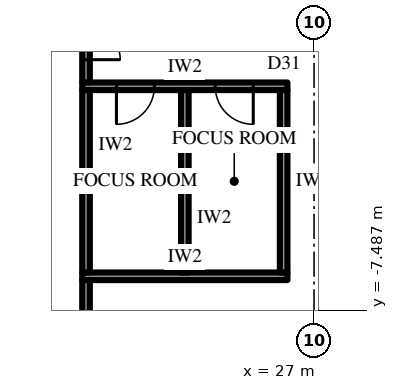
"""IFC4 building model, lengths in metres.
Left out: names, types, materials, properties, quantities, classifications, styles, units other than length and angle.
Written with IfcOpenShell. Run it as: python <this file> out.ifc"""

import sys

from ifc_helpers import new_model, si_unit, direction, frame, frame_2d, origin, place, context, subcontext, project, spatial, rectangle, extrude, element, fill, save


model = new_model("IFC4")
c1 = context("Model", 3, precision=1e-05, world=origin(), true_north=direction((0.0, 1.0)))
c2 = subcontext(c1, "Body", "Model", "MODEL_VIEW")
j1 = project(units=[si_unit("LENGTHUNIT", "METRE"), si_unit("PLANEANGLEUNIT", "RADIAN")], contexts=[c1])
p1 = place(None, origin())
s1 = spatial("IfcSite", under=j1, at=p1, CompositionType="ELEMENT")
p2 = place(p1, origin())
s2 = spatial("IfcBuilding", under=s1, at=p2, CompositionType="ELEMENT")
p3 = place(p2, frame((0.0, 0.0, 44.5)))
s3 = spatial("IfcBuildingStorey", under=s2, at=p3, CompositionType="ELEMENT", Elevation=44.5)
p4 = place(p3, frame((21.232, -30.925, 0.0), z_axis=(0.0, 0.0, 1.0), x_axis=(0.499999163675, 0.866025886636, 0.0)))
e1 = element("IfcWall", 1, at=p4, inside=s3, PredefinedType="SOLIDWALL", context=c2, shape_type="SweptSolid", body=[
    extrude(rectangle(XDim=32.332, YDim=0.3, at=frame_2d((16.166, 0.0))), origin(), (0.0, 0.0, 1.0), 2.7),
])
p5 = place(p4, frame((1.319, 0.0, 0.6)))
e2 = element("IfcOpeningElement", 2, at=p5, cuts=e1, PredefinedType="OPENING", context=c2, shape_type="SweptSolid", body=[
    extrude(rectangle(XDim=2.75, YDim=1.85, at=frame_2d((1.375, 0.925))), frame((0.0, 0.16, 0.0), z_axis=(0.0, -1.0, 0.0), x_axis=(1.0, 0.0, 0.0)), (0.0, 0.0, 1.0), 0.32),
])
p6 = place(p4, frame((6.708, 0.0, 0.6)))
e3 = element("IfcOpeningElement", 3, at=p6, cuts=e1, PredefinedType="OPENING", context=c2, shape_type="SweptSolid", body=[
    extrude(rectangle(XDim=2.75, YDim=1.85, at=frame_2d((1.375, 0.925))), frame((0.0, 0.16, 0.0), z_axis=(0.0, -1.0, 0.0), x_axis=(1.0, 0.0, 0.0)), (0.0, 0.0, 1.0), 0.32),
])
p7 = place(p4, frame((12.872, 0.0, 0.0)))
e4 = element("IfcOpeningElement", 4, at=p7, cuts=e1, PredefinedType="OPENING", context=c2, shape_type="SweptSolid", body=[
    extrude(rectangle(XDim=1.2, YDim=2.4, at=frame_2d((0.6, 1.2))), frame((0.0, 0.16, 0.0), z_axis=(0.0, -1.0, 0.0), x_axis=(1.0, 0.0, 0.0)), (0.0, 0.0, 1.0), 0.32),
])
p8 = place(p4, frame((17.485, 0.0, 0.6)))
e5 = element("IfcOpeningElement", 5, at=p8, cuts=e1, PredefinedType="OPENING", context=c2, shape_type="SweptSolid", body=[
    extrude(rectangle(XDim=2.75, YDim=1.85, at=frame_2d((1.375, 0.925))), frame((0.0, 0.16, 0.0), z_axis=(0.0, -1.0, 0.0), x_axis=(1.0, 0.0, 0.0)), (0.0, 0.0, 1.0), 0.32),
])
p9 = place(p4, frame((22.874, 0.0, 0.6)))
e6 = element("IfcOpeningElement", 6, at=p9, cuts=e1, PredefinedType="OPENING", context=c2, shape_type="SweptSolid", body=[
    extrude(rectangle(XDim=2.75, YDim=1.85, at=frame_2d((1.375, 0.925))), frame((0.0, 0.16, 0.0), z_axis=(0.0, -1.0, 0.0), x_axis=(1.0, 0.0, 0.0)), (0.0, 0.0, 1.0), 0.32),
])
p10 = place(p4, frame((28.262, 0.0, 0.6)))
e7 = element("IfcOpeningElement", 7, at=p10, cuts=e1, PredefinedType="OPENING", context=c2, shape_type="SweptSolid", body=[
    extrude(rectangle(XDim=2.75, YDim=1.85, at=frame_2d((1.375, 0.925))), frame((0.0, 0.16, 0.0), z_axis=(0.0, -1.0, 0.0), x_axis=(1.0, 0.0, 0.0)), (0.0, 0.0, 1.0), 0.32),
])
p11 = place(p3, frame((20.9, -1.6, 0.0), z_axis=(0.0, 0.0, 1.0), x_axis=(1.0, 0.0, 0.0)))
e8 = element("IfcWall", 8, at=p11, inside=s3, PredefinedType="PARTITIONING", context=c2, shape_type="SweptSolid", body=[
    extrude(rectangle(XDim=5.4, YDim=0.2, at=frame_2d((2.7, 0.0))), origin(), (0.0, 0.0, 1.0), 4.0),
])
p12 = place(p11, frame((0.9, 0.0, 0.0)))
e9 = element("IfcOpeningElement", 9, at=p12, cuts=e8, PredefinedType="OPENING", context=c2, shape_type="SweptSolid", body=[
    extrude(rectangle(XDim=1.0, YDim=2.2, at=frame_2d((0.5, 1.1))), frame((0.0, 0.11, 0.0), z_axis=(0.0, -1.0, 0.0), x_axis=(1.0, 0.0, 0.0)), (0.0, 0.0, 1.0), 0.22),
])
p13 = place(p11, frame((3.5, 0.0, 0.0)))
e10 = element("IfcOpeningElement", 10, at=p13, cuts=e8, PredefinedType="OPENING", context=c2, shape_type="SweptSolid", body=[
    extrude(rectangle(XDim=1.0, YDim=2.2, at=frame_2d((0.5, 1.1))), frame((0.0, 0.11, 0.0), z_axis=(0.0, -1.0, 0.0), x_axis=(1.0, 0.0, 0.0)), (0.0, 0.0, 1.0), 0.22),
])
p14 = place(p3, frame((20.9, -6.6, 0.0), z_axis=(0.0, 0.0, 1.0), x_axis=(1.0, 0.0, 0.0)))
e11 = element("IfcWall", 11, at=p14, inside=s3, PredefinedType="PARTITIONING", context=c2, shape_type="SweptSolid", body=[
    extrude(rectangle(XDim=5.4, YDim=0.2, at=frame_2d((2.7, 0.0))), origin(), (0.0, 0.0, 1.0), 4.0),
])
for number, where, z_axis, x_axis in (
    (12, (21.0, -1.7, 0.0), (0.0, 0.0, 1.0), (0.0, -1.0, 0.0)),
    (13, (23.6, -1.7, 0.0), (0.0, 0.0, 1.0), (0.0, -1.0, 0.0)),
    (14, (26.2, -1.7, 0.0), (0.0, 0.0, 1.0), (0.0, -1.0, 0.0)),
):
    element("IfcWall", number, at=place(p3, frame(where, z_axis=z_axis, x_axis=x_axis)), inside=s3, PredefinedType="PARTITIONING", context=c2, shape_type="SweptSolid", body=[
        extrude(rectangle(XDim=4.8, YDim=0.2, at=frame_2d((2.4, 0.0))), origin(), (0.0, 0.0, 1.0), 4.0),
    ])
p15 = place(p3, frame((21.0, -6.701, 0.0), z_axis=(0.0, 0.0, 1.0), x_axis=(0.0, -1.0, 0.0)))
e15 = element("IfcWall", 15, at=p15, inside=s3, PredefinedType="PARTITIONING", context=c2, shape_type="SweptSolid", body=[
    extrude(rectangle(XDim=5.599, YDim=0.2, at=frame_2d((2.8, 0.0))), origin(), (0.0, 0.0, 1.0), 4.0),
])
p16 = place(p3, frame((21.0, 1.499, 0.0), z_axis=(0.0, 0.0, 1.0), x_axis=(0.0, -1.0, 0.0)))
e16 = element("IfcWall", 16, at=p16, inside=s3, PredefinedType="PARTITIONING", context=c2, shape_type="SweptSolid", body=[
    extrude(rectangle(XDim=2.998, YDim=0.2, at=frame_2d((1.499, 0.0))), origin(), (0.0, 0.0, 1.0), 4.0),
])
p17 = place(p16, frame((0.599, 0.0, 0.0)))
e17 = element("IfcOpeningElement", 17, at=p17, cuts=e16, PredefinedType="OPENING", context=c2, shape_type="SweptSolid", body=[
    extrude(rectangle(XDim=1.8, YDim=2.4, at=frame_2d((0.9, 1.2))), frame((0.0, 0.11, 0.0), z_axis=(0.0, -1.0, 0.0), x_axis=(1.0, 0.0, 0.0)), (0.0, 0.0, 1.0), 0.22),
])
p18 = place(p12, frame((1.0, 0.0, 0.0), z_axis=(0.0, 0.0, 1.0), x_axis=(-1.0, 0.0, 0.0)))
e18 = element("IfcDoor", 18, at=p18, inside=s3, OperationType="SINGLE_SWING_LEFT", PredefinedType="DOOR", context=c2, shape_type="SweptSolid", body=[
    extrude(rectangle(XDim=1.0, YDim=2.2, at=frame_2d((0.5, 1.1))), frame((0.0, 0.025, 0.0), z_axis=(0.0, -1.0, 0.0), x_axis=(1.0, 0.0, 0.0)), (0.0, 0.0, 1.0), 0.05),
])
fill(e9, e18)
p19 = place(p13, frame((1.0, 0.0, 0.0), z_axis=(0.0, 0.0, 1.0), x_axis=(-1.0, 0.0, 0.0)))
e19 = element("IfcDoor", 19, at=p19, inside=s3, OperationType="SINGLE_SWING_RIGHT", PredefinedType="DOOR", context=c2, shape_type="SweptSolid", body=[
    extrude(rectangle(XDim=1.0, YDim=2.2, at=frame_2d((0.5, 1.1))), frame((0.0, 0.025, 0.0), z_axis=(0.0, -1.0, 0.0), x_axis=(1.0, 0.0, 0.0)), (0.0, 0.0, 1.0), 0.05),
])
fill(e10, e19)
p20 = place(p17, origin())
e20 = element("IfcDoor", 20, at=p20, inside=s3, OperationType="DOUBLE_DOOR_SINGLE_SWING", PredefinedType="DOOR", context=c2, shape_type="SweptSolid", body=[
    extrude(rectangle(XDim=1.8, YDim=2.4, at=frame_2d((0.9, 1.2))), frame((0.0, 0.025, 0.0), z_axis=(0.0, -1.0, 0.0), x_axis=(1.0, 0.0, 0.0)), (0.0, 0.0, 1.0), 0.05),
])
fill(e17, e20)
save(model, sys.argv[1])
